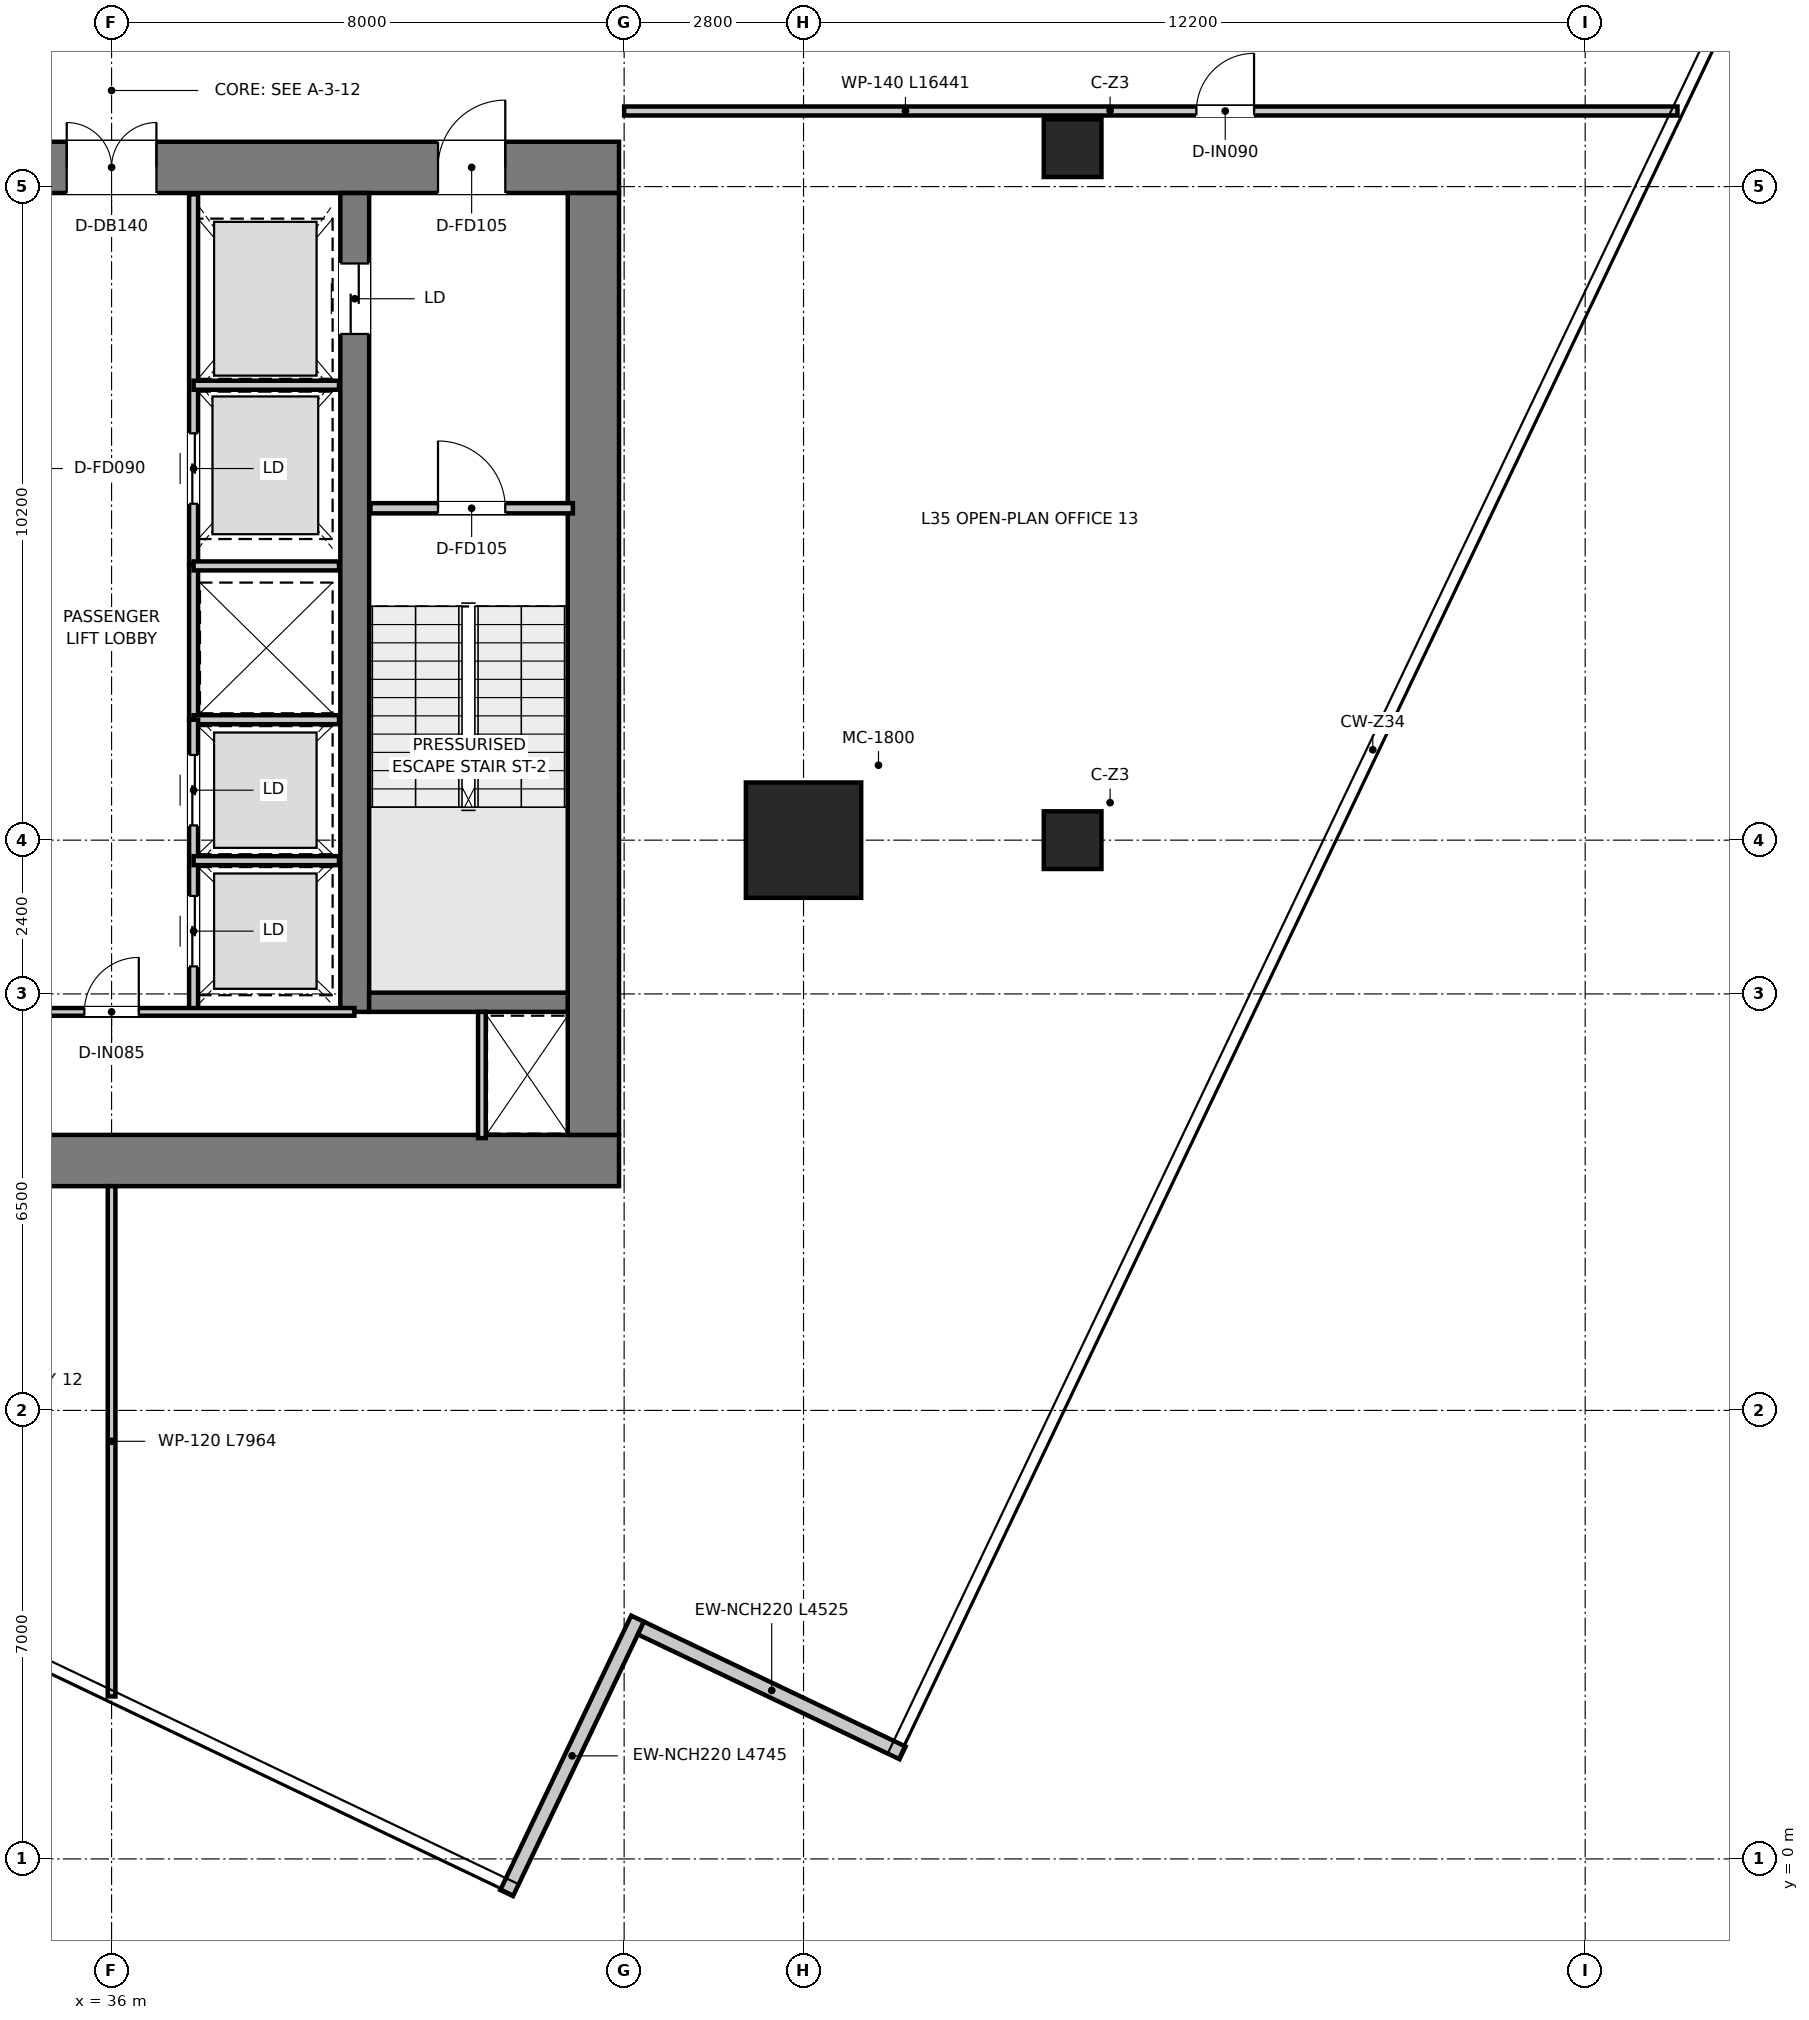
"""IFC4 building model, lengths in metres.
Left out: names, types, materials, properties, quantities, classifications, styles, units other than length and angle.
Written with IfcOpenShell. Run it as: python <this file> out.ifc"""

import sys

from ifc_helpers import new_model, si_unit, direction, frame, frame_2d, origin, origin_2d, place, context, subcontext, project, spatial, rectangle, extrude, source, transform, mapped, element, fill, save


model = new_model("IFC4")
c1 = context("Model", 3, precision=1e-05, world=origin(), true_north=direction((0.0, 1.0)))
c2 = subcontext(c1, "Body", "Model", "MODEL_VIEW")
j1 = project(units=[si_unit("LENGTHUNIT", "METRE"), si_unit("PLANEANGLEUNIT", "RADIAN")], contexts=[c1])
p1 = place(None, origin())
s1 = spatial("IfcSite", under=j1, at=p1, CompositionType="ELEMENT")
p2 = place(p1, origin())
s2 = spatial("IfcBuilding", under=s1, at=p2, CompositionType="ELEMENT")
p3 = place(p2, frame((0.0, 0.0, 146.2)))
s3 = spatial("IfcBuildingStorey", under=s2, at=p3, CompositionType="ELEMENT", Elevation=146.2)
p4 = place(p3, frame((28.08, 10.9, 0.0), z_axis=(0.0, 0.0, 1.0), x_axis=(1.0, 0.0, 0.0)))
e1 = element("IfcWall", 1, at=p4, inside=s3, PredefinedType="SHEAR", context=c2, shape_type="SweptSolid", body=[
    extrude(rectangle(XDim=15.84, YDim=0.8, at=frame_2d((7.92, 0.0))), origin(), (0.0, 0.0, 1.0), 3.95),
])
p5 = place(p3, frame((28.08, 26.4, 0.0), z_axis=(0.0, 0.0, 1.0), x_axis=(1.0, 0.0, 0.0)))
e2 = element("IfcWall", 2, at=p5, inside=s3, PredefinedType="SHEAR", context=c2, shape_type="SweptSolid", body=[
    extrude(rectangle(XDim=15.84, YDim=0.8, at=frame_2d((7.92, 0.0))), origin(), (0.0, 0.0, 1.0), 3.95),
])
p6 = place(p5, frame((7.22, 0.0, 0.0)))
e3 = element("IfcOpeningElement", 3, at=p6, cuts=e2, PredefinedType="OPENING", context=c2, shape_type="SweptSolid", body=[
    extrude(rectangle(XDim=1.4, YDim=2.2, at=frame_2d((0.7, 1.1))), frame((0.0, 0.41, 0.0), z_axis=(0.0, -1.0, 0.0), x_axis=(1.0, 0.0, 0.0)), (0.0, 0.0, 1.0), 0.82),
])
p7 = place(p5, frame((1.775, 0.0, 0.0)))
e4 = element("IfcOpeningElement", 4, at=p7, cuts=e2, PredefinedType="OPENING", context=c2, shape_type="SweptSolid", body=[
    extrude(rectangle(XDim=1.05, YDim=2.1, at=frame_2d((0.525, 1.05))), frame((0.0, 0.41, 0.0), z_axis=(0.0, -1.0, 0.0), x_axis=(1.0, 0.0, 0.0)), (0.0, 0.0, 1.0), 0.82),
])
p8 = place(p5, frame((13.015, 0.0, 0.0)))
e5 = element("IfcOpeningElement", 5, at=p8, cuts=e2, PredefinedType="OPENING", context=c2, shape_type="SweptSolid", body=[
    extrude(rectangle(XDim=1.05, YDim=2.1, at=frame_2d((0.525, 1.05))), frame((0.0, 0.41, 0.0), z_axis=(0.0, -1.0, 0.0), x_axis=(1.0, 0.0, 0.0)), (0.0, 0.0, 1.0), 0.82),
])
p9 = place(p3, frame((43.52, 11.3, 0.0), z_axis=(0.0, 0.0, 1.0), x_axis=(0.0, 1.0, 0.0)))
e6 = element("IfcWall", 6, at=p9, inside=s3, PredefinedType="SHEAR", context=c2, shape_type="SweptSolid", body=[
    extrude(rectangle(XDim=14.7, YDim=0.8, at=frame_2d((7.35, 0.0))), origin(), (0.0, 0.0, 1.0), 3.95),
])
p10 = place(p3, frame((39.795, 13.22, 0.0), z_axis=(0.0, 0.0, 1.0), x_axis=(0.0, 1.0, 0.0)))
e7 = element("IfcWall", 7, at=p10, inside=s3, PredefinedType="SHEAR", context=c2, shape_type="SweptSolid", body=[
    extrude(rectangle(XDim=12.78, YDim=0.45, at=frame_2d((6.39, 0.0))), origin(), (0.0, 0.0, 1.0), 3.95),
])
p11 = place(p10, frame((10.58, 0.0, 0.0)))
e8 = element("IfcOpeningElement", 8, at=p11, cuts=e7, PredefinedType="OPENING", context=c2, shape_type="SweptSolid", body=[
    extrude(rectangle(XDim=1.1, YDim=2.15, at=frame_2d((0.55, 1.075))), frame((0.0, 0.235, 0.0), z_axis=(0.0, -1.0, 0.0), x_axis=(1.0, 0.0, 0.0)), (0.0, 0.0, 1.0), 0.47),
])
p12 = place(p3, frame((40.02, 13.37, 0.0), z_axis=(0.0, 0.0, 1.0), x_axis=(1.0, 0.0, 0.0)))
e9 = element("IfcWall", 9, at=p12, inside=s3, PredefinedType="SHEAR", context=c2, shape_type="SweptSolid", body=[
    extrude(rectangle(XDim=3.1, YDim=0.3, at=frame_2d((1.55, 0.0))), origin(), (0.0, 0.0, 1.0), 3.95),
])
m1 = source(origin(), c2, "Body", "SweptSolid", [
    extrude(rectangle(XDim=1.8, YDim=1.8, at=origin_2d()), origin(), (0.0, 0.0, 1.0), 3.95),
])
p13 = place(p3, frame((46.8, 15.9, 0.0), z_axis=(0.0, 0.0, 1.0), x_axis=(1.0, 0.0, 0.0)))
e10 = element("IfcColumn", 10, at=p13, inside=s3, PredefinedType="USERDEFINED", context=c2, shape_type="MappedRepresentation", body=[
    mapped(m1, transform((0.0, 0.0, 0.0), x_axis=(1.0, 0.0, 0.0), y_axis=(0.0, 1.0, 0.0), z_axis=(0.0, 0.0, 1.0), scale=1.0)),
])
m2 = source(origin(), c2, "Body", "SweptSolid", [
    extrude(rectangle(XDim=0.9, YDim=0.9, at=origin_2d()), origin(), (0.0, 0.0, 1.0), 3.95),
])
for number, where, z_axis, x_axis in (
    (11, (51.0, 26.7, 0.0), (0.0, 0.0, 1.0), (1.0, 0.0, 0.0)),
    (12, (51.0, 15.9, 0.0), (0.0, 0.0, 1.0), (1.0, 0.0, 0.0)),
):
    element("IfcColumn", number, at=place(p3, frame(where, z_axis=z_axis, x_axis=x_axis)), inside=s3, PredefinedType="COLUMN", context=c2, shape_type="MappedRepresentation", body=[
        mapped(m2, transform((0.0, 0.0, 0.0), x_axis=(1.0, 0.0, 0.0), y_axis=(0.0, 1.0, 0.0), z_axis=(0.0, 0.0, 1.0), scale=1.0)),
    ])
p14 = place(p3, frame((42.167, -0.533, 0.0), z_axis=(0.0, 0.0, 1.0), x_axis=(0.430506704164, 0.902587379521, 0.0)))
e13 = element("IfcWall", 13, at=p14, inside=s3, PredefinedType="ELEMENTEDWALL", context=c2, shape_type="SweptSolid", body=[
    extrude(rectangle(XDim=4.745, YDim=0.22, at=frame_2d((2.373, 0.0))), origin(), (0.0, 0.0, 1.0), 3.67),
])
p15 = place(p3, frame((44.261, 3.604, 0.0), z_axis=(0.0, 0.0, 1.0), x_axis=(0.902571105301, -0.430540822542, 0.0)))
e14 = element("IfcWall", 14, at=p15, inside=s3, PredefinedType="ELEMENTEDWALL", context=c2, shape_type="SweptSolid", body=[
    extrude(rectangle(XDim=4.525, YDim=0.22, at=frame_2d((2.263, 0.0))), origin(), (0.0, 0.0, 1.0), 3.67),
])
p16 = place(p3, frame((40.04, 21.08, 0.0), z_axis=(0.0, 0.0, 1.0), x_axis=(1.0, 0.0, 0.0)))
e15 = element("IfcWall", 15, at=p16, inside=s3, PredefinedType="PARTITIONING", context=c2, shape_type="SweptSolid", body=[
    extrude(rectangle(XDim=3.16, YDim=0.16, at=frame_2d((1.58, 0.0))), origin(), (0.0, 0.0, 1.0), 3.67),
])
p17 = place(p16, frame((1.055, 0.0, 0.0)))
e16 = element("IfcOpeningElement", 16, at=p17, cuts=e15, PredefinedType="OPENING", context=c2, shape_type="SweptSolid", body=[
    extrude(rectangle(XDim=1.05, YDim=2.1, at=frame_2d((0.525, 1.05))), frame((0.0, 0.09, 0.0), z_axis=(0.0, -1.0, 0.0), x_axis=(1.0, 0.0, 0.0)), (0.0, 0.0, 1.0), 0.18),
])
p18 = place(p3, frame((37.28, 20.2, 0.0), z_axis=(0.0, 0.0, 1.0), x_axis=(0.0, 1.0, 0.0)))
e17 = element("IfcWall", 17, at=p18, inside=s3, PredefinedType="PARTITIONING", context=c2, shape_type="SweptSolid", body=[
    extrude(rectangle(XDim=5.78, YDim=0.14, at=frame_2d((2.89, 0.0))), origin(), (0.0, 0.0, 1.0), 2.67),
])
p19 = place(p18, frame((0.95, 0.0, 0.0)))
e18 = element("IfcOpeningElement", 18, at=p19, cuts=e17, PredefinedType="OPENING", context=c2, shape_type="SweptSolid", body=[
    extrude(rectangle(XDim=1.1, YDim=2.15, at=frame_2d((0.55, 1.075))), frame((0.0, 0.08, 0.0), z_axis=(0.0, -1.0, 0.0), x_axis=(1.0, 0.0, 0.0)), (0.0, 0.0, 1.0), 0.16),
])
p20 = place(p3, frame((37.28, 23.0, 0.0), z_axis=(0.0, 0.0, 1.0), x_axis=(1.0, 0.0, 0.0)))
e19 = element("IfcWall", 19, at=p20, inside=s3, PredefinedType="PARTITIONING", context=c2, shape_type="SweptSolid", body=[
    extrude(rectangle(XDim=2.27, YDim=0.14, at=frame_2d((1.135, 0.0))), origin(), (0.0, 0.0, 1.0), 2.67),
])
p21 = place(p3, frame((37.28, 17.78, 0.0), z_axis=(0.0, 0.0, 1.0), x_axis=(0.0, 1.0, 0.0)))
e20 = element("IfcWall", 20, at=p21, inside=s3, PredefinedType="PARTITIONING", context=c2, shape_type="SweptSolid", body=[
    extrude(rectangle(XDim=2.42, YDim=0.14, at=frame_2d((1.21, 0.0))), origin(), (0.0, 0.0, 1.0), 3.67),
])
for number, where, z_axis, x_axis in (
    (21, (37.28, 17.78, 0.0), (0.0, 0.0, 1.0), (1.0, 0.0, 0.0)),
    (22, (37.28, 20.18, 0.0), (0.0, 0.0, 1.0), (1.0, 0.0, 0.0)),
):
    element("IfcWall", number, at=place(p3, frame(where, z_axis=z_axis, x_axis=x_axis)), inside=s3, PredefinedType="PARTITIONING", context=c2, shape_type="SweptSolid", body=[
        extrude(rectangle(XDim=2.27, YDim=0.14, at=frame_2d((1.135, 0.0))), origin(), (0.0, 0.0, 1.0), 3.67),
    ])
p22 = place(p3, frame((37.28, 13.22, 0.0), z_axis=(0.0, 0.0, 1.0), x_axis=(0.0, 1.0, 0.0)))
e23 = element("IfcWall", 23, at=p22, inside=s3, PredefinedType="PARTITIONING", context=c2, shape_type="SweptSolid", body=[
    extrude(rectangle(XDim=4.56, YDim=0.14, at=frame_2d((2.28, 0.0))), origin(), (0.0, 0.0, 1.0), 3.67),
])
p23 = place(p22, frame((0.71, 0.0, 0.0)))
e24 = element("IfcOpeningElement", 24, at=p23, cuts=e23, PredefinedType="OPENING", context=c2, shape_type="SweptSolid", body=[
    extrude(rectangle(XDim=1.1, YDim=2.15, at=frame_2d((0.55, 1.075))), frame((0.0, 0.08, 0.0), z_axis=(0.0, -1.0, 0.0), x_axis=(1.0, 0.0, 0.0)), (0.0, 0.0, 1.0), 0.16),
])
p24 = place(p22, frame((2.91, 0.0, 0.0)))
e25 = element("IfcOpeningElement", 25, at=p24, cuts=e23, PredefinedType="OPENING", context=c2, shape_type="SweptSolid", body=[
    extrude(rectangle(XDim=1.1, YDim=2.15, at=frame_2d((0.55, 1.075))), frame((0.0, 0.08, 0.0), z_axis=(0.0, -1.0, 0.0), x_axis=(1.0, 0.0, 0.0)), (0.0, 0.0, 1.0), 0.16),
])
p25 = place(p3, frame((37.28, 15.58, 0.0), z_axis=(0.0, 0.0, 1.0), x_axis=(1.0, 0.0, 0.0)))
e26 = element("IfcWall", 26, at=p25, inside=s3, PredefinedType="PARTITIONING", context=c2, shape_type="SweptSolid", body=[
    extrude(rectangle(XDim=2.27, YDim=0.14, at=frame_2d((1.135, 0.0))), origin(), (0.0, 0.0, 1.0), 3.67),
])
p26 = place(p3, frame((41.78, 11.25, 0.0), z_axis=(0.0, 0.0, 1.0), x_axis=(0.0, 1.0, 0.0)))
e27 = element("IfcWall", 27, at=p26, inside=s3, PredefinedType="PARTITIONING", context=c2, shape_type="SweptSolid", body=[
    extrude(rectangle(XDim=1.97, YDim=0.12, at=frame_2d((0.985, 0.0))), origin(), (0.0, 0.0, 1.0), 3.67),
])
p27 = place(p3, frame((32.21, 13.22, 0.0), z_axis=(0.0, 0.0, 1.0), x_axis=(1.0, 0.0, 0.0)))
e28 = element("IfcWall", 28, at=p27, inside=s3, PredefinedType="PARTITIONING", context=c2, shape_type="SweptSolid", body=[
    extrude(rectangle(XDim=7.58, YDim=0.12, at=frame_2d((3.79, 0.0))), origin(), (0.0, 0.0, 1.0), 3.67),
])
p28 = place(p27, frame((3.365, 0.0, 0.0)))
e29 = element("IfcOpeningElement", 29, at=p28, cuts=e28, PredefinedType="OPENING", context=c2, shape_type="SweptSolid", body=[
    extrude(rectangle(XDim=0.85, YDim=2.1, at=frame_2d((0.425, 1.05))), frame((0.0, 0.07, 0.0), z_axis=(0.0, -1.0, 0.0), x_axis=(1.0, 0.0, 0.0)), (0.0, 0.0, 1.0), 0.14),
])
p29 = place(p3, frame((44.0, 27.28, 0.0), z_axis=(0.0, 0.0, 1.0), x_axis=(1.0, 0.0, 0.0)))
e30 = element("IfcWall", 30, at=p29, inside=s3, PredefinedType="PARTITIONING", context=c2, shape_type="SweptSolid", body=[
    extrude(rectangle(XDim=16.441, YDim=0.14, at=frame_2d((8.22, 0.0))), origin(), (0.0, 0.0, 1.0), 3.03),
])
p30 = place(p29, frame((8.932, 0.0, 0.0)))
e31 = element("IfcOpeningElement", 31, at=p30, cuts=e30, PredefinedType="OPENING", context=c2, shape_type="SweptSolid", body=[
    extrude(rectangle(XDim=0.9, YDim=2.1, at=frame_2d((0.45, 1.05))), frame((0.0, 0.08, 0.0), z_axis=(0.0, -1.0, 0.0), x_axis=(1.0, 0.0, 0.0)), (0.0, 0.0, 1.0), 0.16),
])
p31 = place(p3, frame((36.0, 2.536, 0.0), z_axis=(0.0, 0.0, 1.0), x_axis=(0.0, 1.0, 0.0)))
e32 = element("IfcWall", 32, at=p31, inside=s3, PredefinedType="PARTITIONING", context=c2, shape_type="SweptSolid", body=[
    extrude(rectangle(XDim=7.964, YDim=0.12, at=frame_2d((3.982, 0.0))), origin(), (0.0, 0.0, 1.0), 3.67),
])
p32 = place(p17, origin())
e33 = element("IfcDoor", 33, at=p32, inside=s3, OperationType="SINGLE_SWING_LEFT", PredefinedType="DOOR", context=c2, shape_type="SweptSolid", body=[
    extrude(rectangle(XDim=1.05, YDim=2.1, at=frame_2d((0.525, 1.05))), frame((0.0, 0.025, 0.0), z_axis=(0.0, -1.0, 0.0), x_axis=(1.0, 0.0, 0.0)), (0.0, 0.0, 1.0), 0.05),
])
fill(e16, e33)
p33 = place(p6, origin())
e34 = element("IfcDoor", 34, at=p33, inside=s3, OperationType="DOUBLE_DOOR_SINGLE_SWING", PredefinedType="DOOR", context=c2, shape_type="SweptSolid", body=[
    extrude(rectangle(XDim=1.4, YDim=2.2, at=frame_2d((0.7, 1.1))), frame((0.0, 0.025, 0.0), z_axis=(0.0, -1.0, 0.0), x_axis=(1.0, 0.0, 0.0)), (0.0, 0.0, 1.0), 0.05),
])
fill(e3, e34)
p34 = place(p8, origin())
e35 = element("IfcDoor", 35, at=p34, inside=s3, OperationType="SINGLE_SWING_RIGHT", PredefinedType="DOOR", context=c2, shape_type="SweptSolid", body=[
    extrude(rectangle(XDim=1.05, YDim=2.1, at=frame_2d((0.525, 1.05))), frame((0.0, 0.025, 0.0), z_axis=(0.0, -1.0, 0.0), x_axis=(1.0, 0.0, 0.0)), (0.0, 0.0, 1.0), 0.05),
])
fill(e5, e35)
p35 = place(p11, origin())
e36 = element("IfcDoor", 36, at=p35, inside=s3, OperationType="DOUBLE_DOOR_SLIDING", PredefinedType="DOOR", context=c2, shape_type="SweptSolid", body=[
    extrude(rectangle(XDim=1.1, YDim=2.15, at=frame_2d((0.55, 1.075))), frame((0.0, 0.025, 0.0), z_axis=(0.0, -1.0, 0.0), x_axis=(1.0, 0.0, 0.0)), (0.0, 0.0, 1.0), 0.05),
])
fill(e8, e36)
p36 = place(p19, origin())
e37 = element("IfcDoor", 37, at=p36, inside=s3, OperationType="DOUBLE_DOOR_SLIDING", PredefinedType="DOOR", context=c2, shape_type="SweptSolid", body=[
    extrude(rectangle(XDim=1.1, YDim=2.15, at=frame_2d((0.55, 1.075))), frame((0.0, 0.025, 0.0), z_axis=(0.0, -1.0, 0.0), x_axis=(1.0, 0.0, 0.0)), (0.0, 0.0, 1.0), 0.05),
])
fill(e18, e37)
p37 = place(p23, origin())
e38 = element("IfcDoor", 38, at=p37, inside=s3, OperationType="DOUBLE_DOOR_SLIDING", PredefinedType="DOOR", context=c2, shape_type="SweptSolid", body=[
    extrude(rectangle(XDim=1.1, YDim=2.15, at=frame_2d((0.55, 1.075))), frame((0.0, 0.025, 0.0), z_axis=(0.0, -1.0, 0.0), x_axis=(1.0, 0.0, 0.0)), (0.0, 0.0, 1.0), 0.05),
])
fill(e24, e38)
p38 = place(p24, origin())
e39 = element("IfcDoor", 39, at=p38, inside=s3, OperationType="DOUBLE_DOOR_SLIDING", PredefinedType="DOOR", context=c2, shape_type="SweptSolid", body=[
    extrude(rectangle(XDim=1.1, YDim=2.15, at=frame_2d((0.55, 1.075))), frame((0.0, 0.025, 0.0), z_axis=(0.0, -1.0, 0.0), x_axis=(1.0, 0.0, 0.0)), (0.0, 0.0, 1.0), 0.05),
])
fill(e25, e39)
p39 = place(p28, origin())
e40 = element("IfcDoor", 40, at=p39, inside=s3, OperationType="SINGLE_SWING_RIGHT", PredefinedType="DOOR", context=c2, shape_type="SweptSolid", body=[
    extrude(rectangle(XDim=0.85, YDim=2.1, at=frame_2d((0.425, 1.05))), frame((0.0, 0.025, 0.0), z_axis=(0.0, -1.0, 0.0), x_axis=(1.0, 0.0, 0.0)), (0.0, 0.0, 1.0), 0.05),
])
fill(e29, e40)
p40 = place(p30, origin())
e41 = element("IfcDoor", 41, at=p40, inside=s3, OperationType="SINGLE_SWING_RIGHT", PredefinedType="DOOR", context=c2, shape_type="SweptSolid", body=[
    extrude(rectangle(XDim=0.9, YDim=2.1, at=frame_2d((0.45, 1.05))), frame((0.0, 0.025, 0.0), z_axis=(0.0, -1.0, 0.0), x_axis=(1.0, 0.0, 0.0)), (0.0, 0.0, 1.0), 0.05),
])
fill(e31, e41)
save(model, sys.argv[1])
